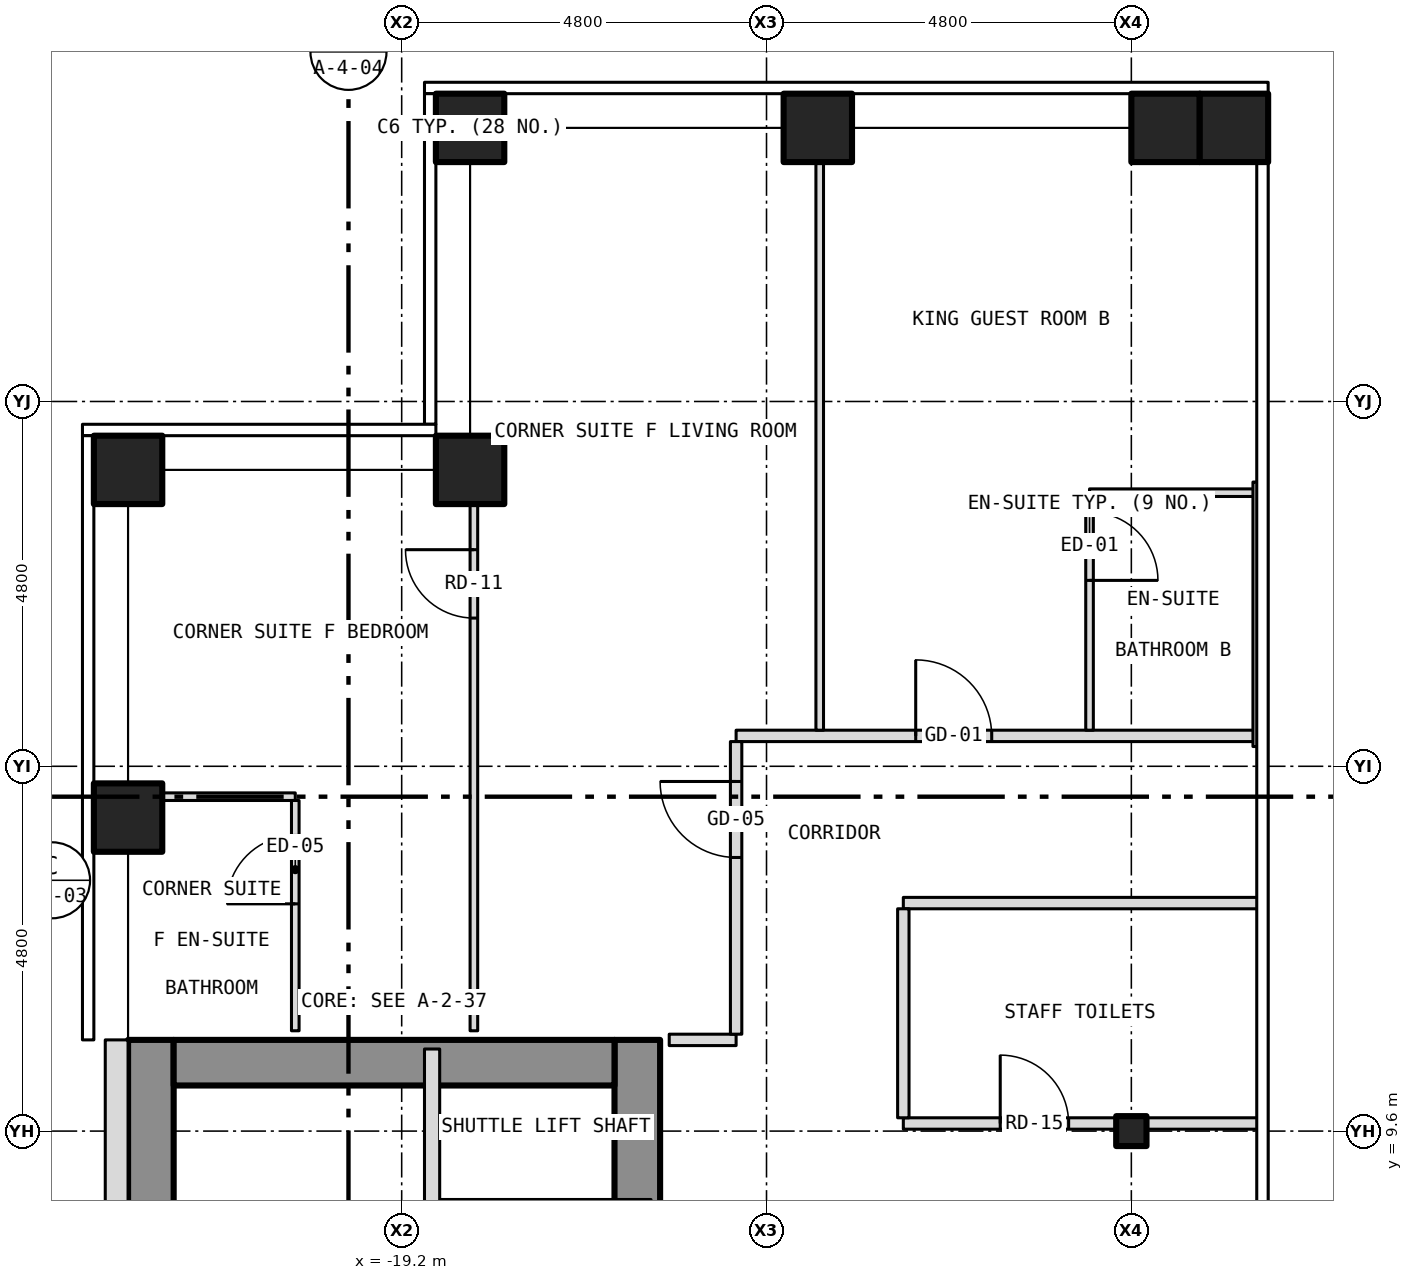
"""IFC4 building model, lengths in metres.
Left out: names, types, materials, properties, quantities, classifications, styles, units other than length and angle.
Written with IfcOpenShell. Run it as: python <this file> out.ifc"""

import sys

from ifc_helpers import new_model, si_unit, direction, frame, frame_2d, origin, origin_2d, place, context, subcontext, project, spatial, rectangle, hollow_rectangle, i_section, extrude, element, fill, save


model = new_model("IFC4")
c1 = context("Model", 3, precision=1e-05, world=origin(), true_north=direction((0.0, 1.0)))
c2 = subcontext(c1, "Body", "Model", "MODEL_VIEW")
j1 = project(units=[si_unit("LENGTHUNIT", "METRE"), si_unit("PLANEANGLEUNIT", "RADIAN")], contexts=[c1])
p1 = place(None, origin())
s1 = spatial("IfcSite", under=j1, at=p1, CompositionType="ELEMENT")
p2 = place(p1, origin())
s2 = spatial("IfcBuilding", under=s1, at=p2, CompositionType="ELEMENT")
p3 = place(p2, frame((0.0, 0.0, 134.5)))
s3 = spatial("IfcBuildingStorey", under=s2, at=p3, CompositionType="ELEMENT", Elevation=134.5)
for number, where, z_axis, x_axis in (
    (1, (-18.3, 22.8, -0.15), (0.0, 0.0, 1.0), (1.0, 0.0, 0.0)),
    (2, (-13.725, 22.8, -0.15), (0.0, 0.0, 1.0), (1.0, 0.0, 0.0)),
    (3, (-9.15, 22.8, -0.15), (0.0, 0.0, 1.0), (1.0, 0.0, 0.0)),
    (4, (-22.8, 13.725, -0.15), (0.0, 0.0, 1.0), (1.0, 0.0, 0.0)),
    (5, (-22.8, 18.3, -0.15), (0.0, 0.0, 1.0), (1.0, 0.0, 0.0)),
    (6, (-18.3, 18.3, -0.15), (0.0, 0.0, 1.0), (1.0, 0.0, 0.0)),
    (7, (-8.25, 22.8, -0.15), (0.0, 0.0, 1.0), (1.0, 0.0, 0.0)),
):
    element("IfcColumn", number, at=place(p3, frame(where, z_axis=z_axis, x_axis=x_axis)), inside=s3, PredefinedType="COLUMN", context=c2, shape_type="SweptSolid", body=[
        extrude(hollow_rectangle(XDim=0.9, YDim=0.9, WallThickness=0.05, at=origin_2d()), origin(), (0.0, 0.0, 1.0), 3.35),
    ])
p4 = place(p3, frame((-9.6, 9.6, -0.15), z_axis=(0.0, 0.0, 1.0), x_axis=(1.0, 0.0, 0.0)))
e8 = element("IfcColumn", 8, at=p4, inside=s3, PredefinedType="COLUMN", context=c2, shape_type="SweptSolid", body=[
    extrude(i_section(OverallWidth=0.399, OverallDepth=0.394, WebThickness=0.023, FlangeThickness=0.037, at=origin_2d()), origin(), (0.0, 0.0, 1.0), 3.35),
])
p5 = place(p3, frame((-16.1, -10.8, 0.0), z_axis=(0.0, 0.0, 1.0), x_axis=(0.0, 1.0, 0.0)))
e9 = element("IfcWall", 9, at=p5, inside=s3, PredefinedType="SHEAR", context=c2, shape_type="SweptSolid", body=[
    extrude(rectangle(XDim=21.6, YDim=0.6, at=frame_2d((10.8, 0.0))), origin(), (0.0, 0.0, 1.0), 2.9),
])
p6 = place(p5, frame((9.4, 0.0, 0.0)))
e10 = element("IfcOpeningElement", 10, at=p6, cuts=e9, PredefinedType="OPENING", context=c2, shape_type="SweptSolid", body=[
    extrude(rectangle(XDim=1.1, YDim=2.1, at=frame_2d((0.55, 1.05))), frame((0.0, 0.312, 0.0), z_axis=(0.0, -1.0, 0.0), x_axis=(1.0, 0.0, 0.0)), (0.0, 0.0, 1.0), 0.624),
])
p7 = place(p5, frame((11.5, 0.0, 0.0)))
e11 = element("IfcOpeningElement", 11, at=p7, cuts=e9, PredefinedType="OPENING", context=c2, shape_type="SweptSolid", body=[
    extrude(rectangle(XDim=1.1, YDim=2.1, at=frame_2d((0.55, 1.05))), frame((0.0, 0.312, 0.0), z_axis=(0.0, -1.0, 0.0), x_axis=(1.0, 0.0, 0.0)), (0.0, 0.0, 1.0), 0.624),
])
p8 = place(p5, frame((13.6, 0.0, 0.0)))
e12 = element("IfcOpeningElement", 12, at=p8, cuts=e9, PredefinedType="OPENING", context=c2, shape_type="SweptSolid", body=[
    extrude(rectangle(XDim=1.1, YDim=2.1, at=frame_2d((0.55, 1.05))), frame((0.0, 0.312, 0.0), z_axis=(0.0, -1.0, 0.0), x_axis=(1.0, 0.0, 0.0)), (0.0, 0.0, 1.0), 0.624),
])
p9 = place(p5, frame((15.7, 0.0, 0.0)))
e13 = element("IfcOpeningElement", 13, at=p9, cuts=e9, PredefinedType="OPENING", context=c2, shape_type="SweptSolid", body=[
    extrude(rectangle(XDim=1.1, YDim=2.1, at=frame_2d((0.55, 1.05))), frame((0.0, 0.312, 0.0), z_axis=(0.0, -1.0, 0.0), x_axis=(1.0, 0.0, 0.0)), (0.0, 0.0, 1.0), 0.624),
])
p10 = place(p5, frame((17.8, 0.0, 0.0)))
e14 = element("IfcOpeningElement", 14, at=p10, cuts=e9, PredefinedType="OPENING", context=c2, shape_type="SweptSolid", body=[
    extrude(rectangle(XDim=1.1, YDim=2.1, at=frame_2d((0.55, 1.05))), frame((0.0, 0.312, 0.0), z_axis=(0.0, -1.0, 0.0), x_axis=(1.0, 0.0, 0.0)), (0.0, 0.0, 1.0), 0.624),
])
p11 = place(p5, frame((0.758, 0.0, 0.0)))
e15 = element("IfcOpeningElement", 15, at=p11, cuts=e9, PredefinedType="OPENING", context=c2, shape_type="SweptSolid", body=[
    extrude(rectangle(XDim=1.1, YDim=2.1, at=frame_2d((0.55, 1.05))), frame((0.0, 0.312, 0.0), z_axis=(0.0, -1.0, 0.0), x_axis=(1.0, 0.0, 0.0)), (0.0, 0.0, 1.0), 0.624),
])
p12 = place(p5, frame((7.5, 0.0, 0.0)))
e16 = element("IfcOpeningElement", 16, at=p12, cuts=e9, PredefinedType="OPENING", context=c2, shape_type="SweptSolid", body=[
    extrude(rectangle(XDim=1.1, YDim=2.1, at=frame_2d((0.55, 1.05))), frame((0.0, 0.312, 0.0), z_axis=(0.0, -1.0, 0.0), x_axis=(1.0, 0.0, 0.0)), (0.0, 0.0, 1.0), 0.624),
])
p13 = place(p3, frame((-22.5, -10.8, 0.0), z_axis=(0.0, 0.0, 1.0), x_axis=(0.0, 1.0, 0.0)))
e17 = element("IfcWall", 17, at=p13, inside=s3, PredefinedType="SHEAR", context=c2, shape_type="SweptSolid", body=[
    extrude(rectangle(XDim=21.6, YDim=0.6, at=frame_2d((10.8, 0.0))), origin(), (0.0, 0.0, 1.0), 2.9),
])
p14 = place(p3, frame((-22.2, 10.5, 0.0), z_axis=(0.0, 0.0, 1.0), x_axis=(1.0, 0.0, 0.0)))
e18 = element("IfcWall", 18, at=p14, inside=s3, PredefinedType="SHEAR", context=c2, shape_type="SweptSolid", body=[
    extrude(rectangle(XDim=5.8, YDim=0.6, at=frame_2d((2.9, 0.0))), origin(), (0.0, 0.0, 1.0), 2.9),
])
p15 = place(p3, frame((-22.95, 10.8, 0.0), z_axis=(0.0, 0.0, 1.0), x_axis=(0.0, -1.0, 0.0)))
e19 = element("IfcWall", 19, at=p15, inside=s3, PredefinedType="SOLIDWALL", context=c2, shape_type="SweptSolid", body=[
    extrude(rectangle(XDim=21.6, YDim=0.3, at=frame_2d((10.8, 0.0))), origin(), (0.0, 0.0, 1.0), 3.5),
])
p16 = place(p15, frame((18.05, 0.0, 1.0)))
e20 = element("IfcOpeningElement", 20, at=p16, cuts=e19, PredefinedType="OPENING", context=c2, shape_type="SweptSolid", body=[
    extrude(rectangle(XDim=0.6, YDim=1.5, at=frame_2d((0.3, 0.75))), frame((0.0, 0.162, 0.0), z_axis=(0.0, -1.0, 0.0), x_axis=(1.0, 0.0, 0.0)), (0.0, 0.0, 1.0), 0.324),
])
p17 = place(p3, frame((-18.8, 8.6, 0.0), z_axis=(0.0, 0.0, 1.0), x_axis=(1.0, 0.0, 0.0)))
e21 = element("IfcWall", 21, at=p17, inside=s3, PredefinedType="PARTITIONING", context=c2, shape_type="SweptSolid", body=[
    extrude(rectangle(XDim=2.88, YDim=0.2, at=frame_2d((1.44, 0.0))), origin(), (0.0, 0.0, 1.0), 2.9),
])
p18 = place(p3, frame((-12.6, 9.7, 0.0), z_axis=(0.0, 0.0, 1.0), x_axis=(1.0, 0.0, 0.0)))
e22 = element("IfcWall", 22, at=p18, inside=s3, PredefinedType="PARTITIONING", context=c2, shape_type="SweptSolid", body=[
    extrude(rectangle(XDim=2.801, YDim=0.15, at=frame_2d((1.4, 0.0))), origin(), (0.0, 0.0, 1.0), 2.578),
])
p19 = place(p18, frame((1.275, 0.0, 0.0)))
e23 = element("IfcOpeningElement", 23, at=p19, cuts=e22, PredefinedType="OPENING", context=c2, shape_type="SweptSolid", body=[
    extrude(rectangle(XDim=0.9, YDim=2.1, at=frame_2d((0.45, 1.05))), frame((0.0, 0.087, 0.0), z_axis=(0.0, -1.0, 0.0), x_axis=(1.0, 0.0, 0.0)), (0.0, 0.0, 1.0), 0.174),
])
p20 = place(p3, frame((-9.799, 9.7, 0.0), z_axis=(0.0, 0.0, 1.0), x_axis=(1.0, 0.0, 0.0)))
e24 = element("IfcWall", 24, at=p20, inside=s3, PredefinedType="PARTITIONING", context=c2, shape_type="SweptSolid", body=[
    extrude(rectangle(XDim=1.879, YDim=0.15, at=frame_2d((0.94, 0.0))), origin(), (0.0, 0.0, 1.0), 3.2),
])
p21 = place(p3, frame((-15.68, 10.8, 0.0), z_axis=(0.0, 0.0, 1.0), x_axis=(1.0, 0.0, 0.0)))
e25 = element("IfcWall", 25, at=p21, inside=s3, PredefinedType="PARTITIONING", context=c2, shape_type="SweptSolid", body=[
    extrude(rectangle(XDim=0.88, YDim=0.15, at=frame_2d((0.44, 0.0))), origin(), (0.0, 0.0, 1.0), 3.2),
])
p22 = place(p3, frame((-12.6, 12.6, 0.0), z_axis=(0.0, 0.0, 1.0), x_axis=(1.0, 0.0, 0.0)))
e26 = element("IfcWall", 26, at=p22, inside=s3, PredefinedType="PARTITIONING", context=c2, shape_type="SweptSolid", body=[
    extrude(rectangle(XDim=4.68, YDim=0.15, at=frame_2d((2.34, 0.0))), origin(), (0.0, 0.0, 1.0), 3.2),
])
p23 = place(p3, frame((-22.68, 14.0, 0.0), z_axis=(0.0, 0.0, 1.0), x_axis=(1.0, 0.0, 0.0)))
e27 = element("IfcWall", 27, at=p23, inside=s3, PredefinedType="PARTITIONING", context=c2, shape_type="SweptSolid", body=[
    extrude(rectangle(XDim=2.08, YDim=0.1, at=frame_2d((1.04, 0.0))), origin(), (0.0, 0.0, 1.0), 3.2),
])
p24 = place(p3, frame((-14.8, 14.8, 0.0), z_axis=(0.0, 0.0, 1.0), x_axis=(1.0, 0.0, 0.0)))
e28 = element("IfcWall", 28, at=p24, inside=s3, PredefinedType="PARTITIONING", context=c2, shape_type="SweptSolid", body=[
    extrude(rectangle(XDim=6.85, YDim=0.15, at=frame_2d((3.425, 0.0))), origin(), (0.0, 0.0, 1.0), 3.2),
])
p25 = place(p24, frame((2.363, 0.0, 0.0)))
e29 = element("IfcOpeningElement", 29, at=p25, cuts=e28, PredefinedType="OPENING", context=c2, shape_type="SweptSolid", body=[
    extrude(rectangle(XDim=1.0, YDim=2.1, at=frame_2d((0.5, 1.05))), frame((0.0, 0.087, 0.0), z_axis=(0.0, -1.0, 0.0), x_axis=(1.0, 0.0, 0.0)), (0.0, 0.0, 1.0), 0.174),
])
p26 = place(p3, frame((-10.15, 18.0, 0.0), z_axis=(0.0, 0.0, 1.0), x_axis=(1.0, 0.0, 0.0)))
e30 = element("IfcWall", 30, at=p26, inside=s3, PredefinedType="PARTITIONING", context=c2, shape_type="SweptSolid", body=[
    extrude(rectangle(XDim=2.2, YDim=0.1, at=frame_2d((1.1, 0.0))), origin(), (0.0, 0.0, 1.0), 3.2),
])
p27 = place(p3, frame((-20.6, 10.92, 0.0), z_axis=(0.0, 0.0, 1.0), x_axis=(0.0, 1.0, 0.0)))
e31 = element("IfcWall", 31, at=p27, inside=s3, PredefinedType="PARTITIONING", context=c2, shape_type="SweptSolid", body=[
    extrude(rectangle(XDim=3.03, YDim=0.1, at=frame_2d((1.515, 0.0))), origin(), (0.0, 0.0, 1.0), 3.2),
])
p28 = place(p27, frame((1.67, 0.0, 0.0)))
e32 = element("IfcOpeningElement", 32, at=p28, cuts=e31, PredefinedType="OPENING", context=c2, shape_type="SweptSolid", body=[
    extrude(rectangle(XDim=0.9, YDim=2.1, at=frame_2d((0.45, 1.05))), frame((0.0, 0.062, 0.0), z_axis=(0.0, -1.0, 0.0), x_axis=(1.0, 0.0, 0.0)), (0.0, 0.0, 1.0), 0.124),
])
p29 = place(p3, frame((-18.8, 4.45, 0.0), z_axis=(0.0, 0.0, 1.0), x_axis=(0.0, 1.0, 0.0)))
e33 = element("IfcWall", 33, at=p29, inside=s3, PredefinedType="PARTITIONING", context=c2, shape_type="SweptSolid", body=[
    extrude(rectangle(XDim=6.23, YDim=0.2, at=frame_2d((3.115, 0.0))), origin(), (0.0, 0.0, 1.0), 2.9),
])
p30 = place(p3, frame((-18.25, 10.92, 0.0), z_axis=(0.0, 0.0, 1.0), x_axis=(0.0, 1.0, 0.0)))
e34 = element("IfcWall", 34, at=p30, inside=s3, PredefinedType="PARTITIONING", context=c2, shape_type="SweptSolid", body=[
    extrude(rectangle(XDim=7.271, YDim=0.1, at=frame_2d((3.635, 0.0))), origin(), (0.0, 0.0, 1.0), 3.2),
])
p31 = place(p30, frame((5.43, 0.0, 0.0)))
e35 = element("IfcOpeningElement", 35, at=p31, cuts=e34, PredefinedType="OPENING", context=c2, shape_type="SweptSolid", body=[
    extrude(rectangle(XDim=0.9, YDim=2.1, at=frame_2d((0.45, 1.05))), frame((0.0, 0.062, 0.0), z_axis=(0.0, -1.0, 0.0), x_axis=(1.0, 0.0, 0.0)), (0.0, 0.0, 1.0), 0.124),
])
p32 = place(p3, frame((-14.8, 10.875, 0.0), z_axis=(0.0, 0.0, 1.0), x_axis=(0.0, 1.0, 0.0)))
e36 = element("IfcWall", 36, at=p32, inside=s3, PredefinedType="PARTITIONING", context=c2, shape_type="SweptSolid", body=[
    extrude(rectangle(XDim=3.85, YDim=0.15, at=frame_2d((1.925, 0.0))), origin(), (0.0, 0.0, 1.0), 3.2),
])
p33 = place(p32, frame((2.325, 0.0, 0.0)))
e37 = element("IfcOpeningElement", 37, at=p33, cuts=e36, PredefinedType="OPENING", context=c2, shape_type="SweptSolid", body=[
    extrude(rectangle(XDim=1.0, YDim=2.1, at=frame_2d((0.5, 1.05))), frame((0.0, 0.087, 0.0), z_axis=(0.0, -1.0, 0.0), x_axis=(1.0, 0.0, 0.0)), (0.0, 0.0, 1.0), 0.174),
])
p34 = place(p3, frame((-13.7, 14.875, 0.0), z_axis=(0.0, 0.0, 1.0), x_axis=(0.0, 1.0, 0.0)))
e38 = element("IfcWall", 38, at=p34, inside=s3, PredefinedType="PARTITIONING", context=c2, shape_type="SweptSolid", body=[
    extrude(rectangle(XDim=7.805, YDim=0.1, at=frame_2d((3.902, 0.0))), origin(), (0.0, 0.0, 1.0), 3.2),
])
p35 = place(p3, frame((-12.6, 9.775, 0.0), z_axis=(0.0, 0.0, 1.0), x_axis=(0.0, 1.0, 0.0)))
e39 = element("IfcWall", 39, at=p35, inside=s3, PredefinedType="PARTITIONING", context=c2, shape_type="SweptSolid", body=[
    extrude(rectangle(XDim=2.75, YDim=0.15, at=frame_2d((1.375, 0.0))), origin(), (0.0, 0.0, 1.0), 3.2),
])
p36 = place(p3, frame((-10.15, 14.875, 0.0), z_axis=(0.0, 0.0, 1.0), x_axis=(0.0, 1.0, 0.0)))
e40 = element("IfcWall", 40, at=p36, inside=s3, PredefinedType="PARTITIONING", context=c2, shape_type="SweptSolid", body=[
    extrude(rectangle(XDim=3.075, YDim=0.1, at=frame_2d((1.538, 0.0))), origin(), (0.0, 0.0, 1.0), 3.2),
])
p37 = place(p36, frame((1.971, 0.0, 0.0)))
e41 = element("IfcOpeningElement", 41, at=p37, cuts=e40, PredefinedType="OPENING", context=c2, shape_type="SweptSolid", body=[
    extrude(rectangle(XDim=0.9, YDim=2.1, at=frame_2d((0.45, 1.05))), frame((0.0, 0.062, 0.0), z_axis=(0.0, -1.0, 0.0), x_axis=(1.0, 0.0, 0.0)), (0.0, 0.0, 1.0), 0.124),
])
p38 = place(p3, frame((-7.95, 14.66, 0.0), z_axis=(0.0, 0.0, 1.0), x_axis=(0.0, 1.0, 0.0)))
e42 = element("IfcWall", 42, at=p38, inside=s3, PredefinedType="PARTITIONING", context=c2, shape_type="SweptSolid", body=[
    extrude(rectangle(XDim=3.48, YDim=0.1, at=frame_2d((1.74, 0.0))), origin(), (0.0, 0.0, 1.0), 3.2),
])
p39 = place(p25, origin())
e43 = element("IfcDoor", 43, at=p39, inside=s3, OperationType="SINGLE_SWING_LEFT", PredefinedType="DOOR", context=c2, shape_type="SweptSolid", body=[
    extrude(rectangle(XDim=1.0, YDim=2.1, at=frame_2d((0.5, 1.05))), frame((0.0, 0.025, 0.0), z_axis=(0.0, -1.0, 0.0), x_axis=(1.0, 0.0, 0.0)), (0.0, 0.0, 1.0), 0.05),
])
fill(e29, e43)
p40 = place(p37, origin())
e44 = element("IfcDoor", 44, at=p40, inside=s3, OperationType="SINGLE_SWING_LEFT", PredefinedType="DOOR", context=c2, shape_type="SweptSolid", body=[
    extrude(rectangle(XDim=0.9, YDim=2.1, at=frame_2d((0.45, 1.05))), frame((0.0, 0.025, 0.0), z_axis=(0.0, -1.0, 0.0), x_axis=(1.0, 0.0, 0.0)), (0.0, 0.0, 1.0), 0.05),
])
fill(e41, e44)
p41 = place(p33, origin())
e45 = element("IfcDoor", 45, at=p41, inside=s3, OperationType="SINGLE_SWING_RIGHT", PredefinedType="DOOR", context=c2, shape_type="SweptSolid", body=[
    extrude(rectangle(XDim=1.0, YDim=2.1, at=frame_2d((0.5, 1.05))), frame((0.0, 0.025, 0.0), z_axis=(0.0, -1.0, 0.0), x_axis=(1.0, 0.0, 0.0)), (0.0, 0.0, 1.0), 0.05),
])
fill(e37, e45)
p42 = place(p31, origin())
e46 = element("IfcDoor", 46, at=p42, inside=s3, OperationType="SINGLE_SWING_RIGHT", PredefinedType="DOOR", context=c2, shape_type="SweptSolid", body=[
    extrude(rectangle(XDim=0.9, YDim=2.1, at=frame_2d((0.45, 1.05))), frame((0.0, 0.025, 0.0), z_axis=(0.0, -1.0, 0.0), x_axis=(1.0, 0.0, 0.0)), (0.0, 0.0, 1.0), 0.05),
])
fill(e35, e46)
p43 = place(p28, origin())
e47 = element("IfcDoor", 47, at=p43, inside=s3, OperationType="SINGLE_SWING_LEFT", PredefinedType="DOOR", context=c2, shape_type="SweptSolid", body=[
    extrude(rectangle(XDim=0.9, YDim=2.1, at=frame_2d((0.45, 1.05))), frame((0.0, 0.025, 0.0), z_axis=(0.0, -1.0, 0.0), x_axis=(1.0, 0.0, 0.0)), (0.0, 0.0, 1.0), 0.05),
])
fill(e32, e47)
p44 = place(p19, origin())
e48 = element("IfcDoor", 48, at=p44, inside=s3, OperationType="SINGLE_SWING_LEFT", PredefinedType="DOOR", context=c2, shape_type="SweptSolid", body=[
    extrude(rectangle(XDim=0.9, YDim=2.1, at=frame_2d((0.45, 1.05))), frame((0.0, 0.025, 0.0), z_axis=(0.0, -1.0, 0.0), x_axis=(1.0, 0.0, 0.0)), (0.0, 0.0, 1.0), 0.05),
])
fill(e23, e48)
save(model, sys.argv[1])
